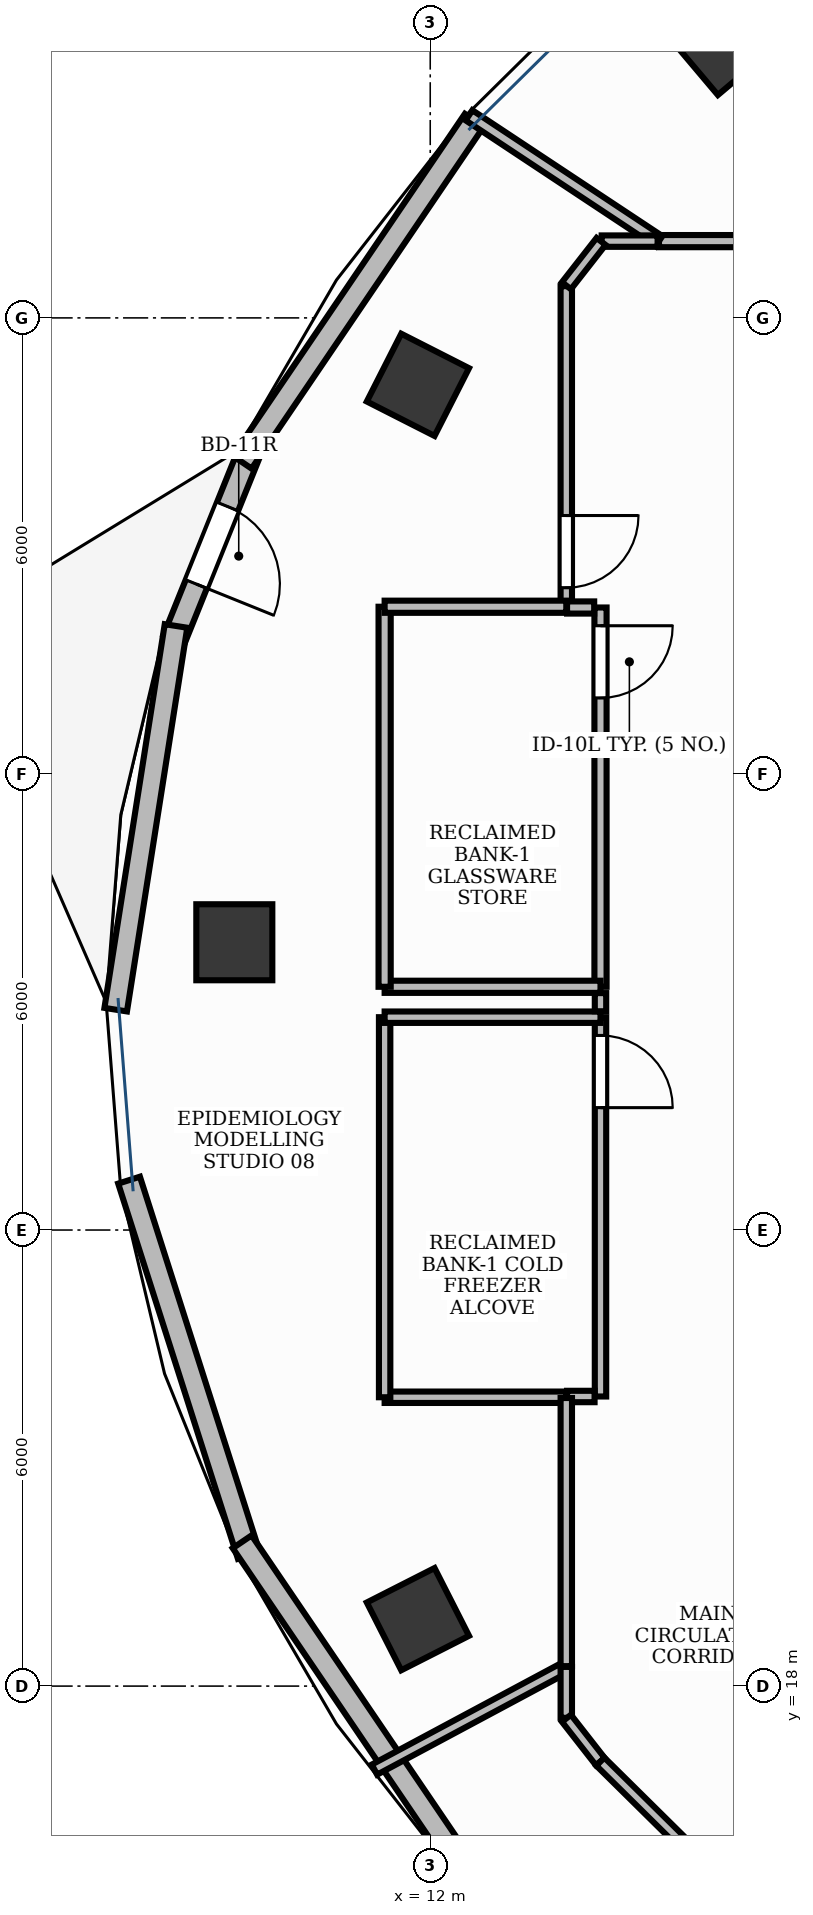
"""IFC4 building model, lengths in metres.
Left out: names, types, materials, properties, quantities, classifications, styles, units other than length and angle.
Written with IfcOpenShell. Run it as: python <this file> out.ifc"""

import sys

from ifc_helpers import new_model, si_unit, direction, frame, frame_2d, origin, origin_2d, place, context, subcontext, project, spatial, rectangle, extrude, element, fill, save


model = new_model("IFC4")
c1 = context("Model", 3, precision=1e-05, world=origin(), true_north=direction((0.0, 1.0)))
c2 = subcontext(c1, "Body", "Model", "MODEL_VIEW")
j1 = project(units=[si_unit("LENGTHUNIT", "METRE"), si_unit("PLANEANGLEUNIT", "RADIAN")], contexts=[c1])
p1 = place(None, origin())
s1 = spatial("IfcSite", under=j1, at=p1, CompositionType="ELEMENT")
p2 = place(p1, origin())
s2 = spatial("IfcBuilding", under=s1, at=p2, CompositionType="ELEMENT")
p3 = place(p2, frame((0.0, 0.0, 171.0)))
s3 = spatial("IfcBuildingStorey", under=s2, at=p3, CompositionType="ELEMENT", Elevation=171.0)
for number, where, z_axis, x_axis in (
    (1, (15.844, 39.637, -0.0), (0.0, 0.0, 1.0), (0.764, 0.645, 0.0)),
    (2, (11.838, 35.119, -0.0), (0.0, 0.0, 1.0), (0.453, 0.891, 0.0)),
    (3, (9.423, 27.786, -0.0), (0.0, 0.0, 1.0), (0.0, 1.0, 0.0)),
    (4, (11.838, 18.881, -0.0), (0.0, 0.0, 1.0), (-0.453, 0.891, 0.0)),
):
    element("IfcColumn", number, at=place(p3, frame(where, z_axis=z_axis, x_axis=x_axis)), inside=s3, PredefinedType="COLUMN", context=c2, shape_type="SweptSolid", body=[
        extrude(rectangle(XDim=1.0, YDim=1.0, at=origin_2d()), origin(), (0.0, 0.0, 1.0), 3.901),
    ])
p4 = place(p3, frame((9.626, 34.242, 0.0), z_axis=(0.0, 0.0, 1.0), x_axis=(-0.373983610438, -0.927435312636, 0.0)))
e5 = element("IfcWall", 5, at=p4, inside=s3, PredefinedType="STANDARD", context=c2, shape_type="SweptSolid", body=[
    extrude(rectangle(XDim=2.661, YDim=0.3, at=frame_2d((1.331, 0.0))), origin(), (0.0, 0.0, 1.0), 3.9),
])
p5 = place(p4, frame((0.781, 0.0, 0.0)))
e6 = element("IfcOpeningElement", 6, at=p5, cuts=e5, PredefinedType="OPENING", context=c2, shape_type="SweptSolid", body=[
    extrude(rectangle(XDim=1.1, YDim=2.15, at=frame_2d((0.55, 1.075))), frame((0.0, 0.165, 0.0), z_axis=(0.0, -1.0, 0.0), x_axis=(1.0, 0.0, 0.0)), (0.0, 0.0, 1.0), 0.33),
])
p6 = place(p3, frame((12.58, 38.601, 0.0), z_axis=(0.0, 0.0, 1.0), x_axis=(-0.561663900064, -0.827365495634, 0.0)))
e7 = element("IfcWall", 7, at=p6, inside=s3, PredefinedType="STANDARD", context=c2, shape_type="SweptSolid", body=[
    extrude(rectangle(XDim=5.438, YDim=0.3, at=frame_2d((2.719, 0.0))), origin(), (0.0, 0.0, 1.0), 3.9),
])
p7 = place(p3, frame((8.655, 31.947, 0.0), z_axis=(0.0, 0.0, 1.0), x_axis=(-0.155280464429, -0.987870425393, 0.0)))
e8 = element("IfcWall", 8, at=p7, inside=s3, PredefinedType="STANDARD", context=c2, shape_type="SweptSolid", body=[
    extrude(rectangle(XDim=5.11, YDim=0.3, at=frame_2d((2.555, 0.0))), origin(), (0.0, 0.0, 1.0), 3.9),
])
p8 = place(p3, frame((8.038, 24.656, 0.0), z_axis=(0.0, 0.0, 1.0), x_axis=(0.303930984078, -0.952694052106, 0.0)))
e9 = element("IfcWall", 9, at=p8, inside=s3, PredefinedType="STANDARD", context=c2, shape_type="SweptSolid", body=[
    extrude(rectangle(XDim=5.181, YDim=0.3, at=frame_2d((2.591, 0.0))), origin(), (0.0, 0.0, 1.0), 3.47),
])
p9 = place(p3, frame((9.526, 19.898, 0.0), z_axis=(0.0, 0.0, 1.0), x_axis=(0.561663900064, -0.827365495634, 0.0)))
e10 = element("IfcWall", 10, at=p9, inside=s3, PredefinedType="STANDARD", context=c2, shape_type="SweptSolid", body=[
    extrude(rectangle(XDim=5.438, YDim=0.3, at=frame_2d((2.719, 0.0))), origin(), (0.0, 0.0, 1.0), 3.47),
])
p10 = place(p3, frame((14.24, 26.8, 0.0), z_axis=(0.0, 0.0, 1.0), x_axis=(0.0, -1.0, 0.0)))
e11 = element("IfcWall", 11, at=p10, inside=s3, PredefinedType="PARTITIONING", context=c2, shape_type="SweptSolid", body=[
    extrude(rectangle(XDim=4.99, YDim=0.15, at=frame_2d((2.495, 0.0))), origin(), (0.0, 0.0, 1.0), 2.91),
])
p11 = place(p10, frame((0.24, 0.0, 0.0)))
e12 = element("IfcOpeningElement", 12, at=p11, cuts=e11, PredefinedType="OPENING", context=c2, shape_type="SweptSolid", body=[
    extrude(rectangle(XDim=0.95, YDim=2.15, at=frame_2d((0.475, 1.075))), frame((0.0, 0.09, 0.0), z_axis=(0.0, -1.0, 0.0), x_axis=(1.0, 0.0, 0.0)), (0.0, 0.0, 1.0), 0.18),
])
p12 = place(p3, frame((14.24, 32.19, 0.0), z_axis=(0.0, 0.0, 1.0), x_axis=(0.0, -1.0, 0.0)))
e13 = element("IfcWall", 13, at=p12, inside=s3, PredefinedType="PARTITIONING", context=c2, shape_type="SweptSolid", body=[
    extrude(rectangle(XDim=4.99, YDim=0.16, at=frame_2d((2.495, 0.0))), origin(), (0.0, 0.0, 1.0), 2.91),
])
p13 = place(p12, frame((0.24, 0.0, 0.0)))
e14 = element("IfcOpeningElement", 14, at=p13, cuts=e13, PredefinedType="OPENING", context=c2, shape_type="SweptSolid", body=[
    extrude(rectangle(XDim=0.95, YDim=2.15, at=frame_2d((0.475, 1.075))), frame((0.0, 0.095, 0.0), z_axis=(0.0, -1.0, 0.0), x_axis=(1.0, 0.0, 0.0)), (0.0, 0.0, 1.0), 0.19),
])
p14 = place(p3, frame((13.79, 36.417, 0.0), z_axis=(0.0, 0.0, 1.0), x_axis=(0.0, -1.0, 0.0)))
e15 = element("IfcWall", 15, at=p14, inside=s3, PredefinedType="PARTITIONING", context=c2, shape_type="SweptSolid", body=[
    extrude(rectangle(XDim=4.208, YDim=0.15, at=frame_2d((2.104, 0.0))), origin(), (0.0, 0.0, 1.0), 2.91),
])
p15 = place(p14, frame((3.017, 0.0, 0.0)))
e16 = element("IfcOpeningElement", 16, at=p15, cuts=e15, PredefinedType="OPENING", context=c2, shape_type="SweptSolid", body=[
    extrude(rectangle(XDim=0.95, YDim=2.15, at=frame_2d((0.475, 1.075))), frame((0.0, 0.09, 0.0), z_axis=(0.0, -1.0, 0.0), x_axis=(1.0, 0.0, 0.0)), (0.0, 0.0, 1.0), 0.18),
])
p16 = place(p3, frame((14.162, 21.81, 0.0), z_axis=(0.0, 0.0, 1.0), x_axis=(-1.0, 0.0, 0.0)))
e17 = element("IfcWall", 17, at=p16, inside=s3, PredefinedType="PARTITIONING", context=c2, shape_type="SweptSolid", body=[
    extrude(rectangle(XDim=0.362, YDim=0.15, at=frame_2d((0.181, 0.0))), origin(), (0.0, 0.0, 1.0), 2.91),
])
p17 = place(p3, frame((13.79, 21.8, 0.0), z_axis=(0.0, 0.0, 1.0), x_axis=(-1.0, 0.0, 0.0)))
e18 = element("IfcWall", 18, at=p17, inside=s3, PredefinedType="PARTITIONING", context=c2, shape_type="SweptSolid", body=[
    extrude(rectangle(XDim=2.39, YDim=0.15, at=frame_2d((1.195, 0.0))), origin(), (0.0, 0.0, 1.0), 2.91),
])
p18 = place(p3, frame((11.4, 21.8, 0.0), z_axis=(0.0, 0.0, 1.0), x_axis=(0.0, 1.0, 0.0)))
e19 = element("IfcWall", 19, at=p18, inside=s3, PredefinedType="PARTITIONING", context=c2, shape_type="SweptSolid", body=[
    extrude(rectangle(XDim=5.0, YDim=0.15, at=frame_2d((2.5, 0.0))), origin(), (0.0, 0.0, 1.0), 2.91),
])
p19 = place(p3, frame((11.4, 26.8, 0.0), z_axis=(0.0, 0.0, 1.0), x_axis=(1.0, 0.0, 0.0)))
e20 = element("IfcWall", 20, at=p19, inside=s3, PredefinedType="PARTITIONING", context=c2, shape_type="SweptSolid", body=[
    extrude(rectangle(XDim=2.84, YDim=0.15, at=frame_2d((1.42, 0.0))), origin(), (0.0, 0.0, 1.0), 2.91),
])
p20 = place(p3, frame((13.8, 32.19, 0.0), z_axis=(0.0, 0.0, 1.0), x_axis=(1.0, 0.0, 0.0)))
e21 = element("IfcWall", 21, at=p20, inside=s3, PredefinedType="PARTITIONING", context=c2, shape_type="SweptSolid", body=[
    extrude(rectangle(XDim=0.357, YDim=0.16, at=frame_2d((0.178, 0.0))), origin(), (0.0, 0.0, 1.0), 2.91),
])
p21 = place(p3, frame((14.24, 27.2, 0.0), z_axis=(0.0, 0.0, 1.0), x_axis=(-1.0, 0.0, 0.0)))
e22 = element("IfcWall", 22, at=p21, inside=s3, PredefinedType="PARTITIONING", context=c2, shape_type="SweptSolid", body=[
    extrude(rectangle(XDim=2.84, YDim=0.16, at=frame_2d((1.42, 0.0))), origin(), (0.0, 0.0, 1.0), 2.91),
])
p22 = place(p3, frame((11.4, 27.2, 0.0), z_axis=(0.0, 0.0, 1.0), x_axis=(0.0, 1.0, 0.0)))
e23 = element("IfcWall", 23, at=p22, inside=s3, PredefinedType="PARTITIONING", context=c2, shape_type="SweptSolid", body=[
    extrude(rectangle(XDim=5.0, YDim=0.16, at=frame_2d((2.5, 0.0))), origin(), (0.0, 0.0, 1.0), 2.91),
])
p23 = place(p3, frame((11.4, 32.2, 0.0), z_axis=(0.0, 0.0, 1.0), x_axis=(1.0, 0.0, 0.0)))
e24 = element("IfcWall", 24, at=p23, inside=s3, PredefinedType="PARTITIONING", context=c2, shape_type="SweptSolid", body=[
    extrude(rectangle(XDim=2.39, YDim=0.16, at=frame_2d((1.195, 0.0))), origin(), (0.0, 0.0, 1.0), 2.91),
])
p24 = place(p3, frame((11.266, 16.901, 0.0), z_axis=(0.0, 0.0, 1.0), x_axis=(0.8815585549, 0.472074691423, 0.0)))
e25 = element("IfcWall", 25, at=p24, inside=s3, PredefinedType="PARTITIONING", context=c2, shape_type="SweptSolid", body=[
    extrude(rectangle(XDim=2.863, YDim=0.15, at=frame_2d((1.432, 0.0))), origin(), (0.0, 0.0, 1.0), 2.91),
])
p25 = place(p3, frame((13.79, 18.253, 0.0), z_axis=(0.0, 0.0, 1.0), x_axis=(0.0, -1.0, 0.0)))
e26 = element("IfcWall", 26, at=p25, inside=s3, PredefinedType="PARTITIONING", context=c2, shape_type="SweptSolid", body=[
    extrude(rectangle(XDim=0.67, YDim=0.15, at=frame_2d((0.335, 0.0))), origin(), (0.0, 0.0, 1.0), 2.91),
])
p26 = place(p3, frame((13.792, 17.576, 0.0), z_axis=(0.0, 0.0, 1.0), x_axis=(0.615925776879, -0.787804187204, 0.0)))
e27 = element("IfcWall", 27, at=p26, inside=s3, PredefinedType="PARTITIONING", context=c2, shape_type="SweptSolid", body=[
    extrude(rectangle(XDim=0.723, YDim=0.15, at=frame_2d((0.361, 0.0))), origin(), (0.0, 0.0, 1.0), 2.91),
])
p27 = place(p3, frame((14.238, 17.006, 0.0), z_axis=(0.0, 0.0, 1.0), x_axis=(0.711447157113, -0.702739598027, 0.0)))
e28 = element("IfcWall", 28, at=p27, inside=s3, PredefinedType="PARTITIONING", context=c2, shape_type="SweptSolid", body=[
    extrude(rectangle(XDim=2.467, YDim=0.15, at=frame_2d((1.234, 0.0))), origin(), (0.0, 0.0, 1.0), 2.91),
])
p28 = place(p3, frame((17.6, 37.01, 0.0), z_axis=(0.0, 0.0, 1.0), x_axis=(-1.0, 0.0, 0.0)))
e29 = element("IfcWall", 29, at=p28, inside=s3, PredefinedType="PARTITIONING", context=c2, shape_type="SweptSolid", body=[
    extrude(rectangle(XDim=2.591, YDim=0.16, at=frame_2d((1.295, 0.0))), origin(), (0.0, 0.0, 1.0), 2.91),
])
p29 = place(p3, frame((15.01, 37.01, 0.0), z_axis=(0.0, 0.0, 1.0), x_axis=(-0.833750277905, 0.552141715589, 0.0)))
e30 = element("IfcWall", 30, at=p29, inside=s3, PredefinedType="PARTITIONING", context=c2, shape_type="SweptSolid", body=[
    extrude(rectangle(XDim=2.998, YDim=0.16, at=frame_2d((1.499, 0.0))), origin(), (0.0, 0.0, 1.0), 2.91),
])
p30 = place(p3, frame((14.991, 37.01, 0.0), z_axis=(0.0, 0.0, 1.0), x_axis=(-1.0, 0.0, 0.0)))
e31 = element("IfcWall", 31, at=p30, inside=s3, PredefinedType="PARTITIONING", context=c2, shape_type="SweptSolid", body=[
    extrude(rectangle(XDim=0.736, YDim=0.15, at=frame_2d((0.368, 0.0))), origin(), (0.0, 0.0, 1.0), 2.91),
])
p31 = place(p3, frame((14.248, 37.006, 0.0), z_axis=(0.0, 0.0, 1.0), x_axis=(-0.616041172792, -0.787713954063, 0.0)))
e32 = element("IfcWall", 32, at=p31, inside=s3, PredefinedType="PARTITIONING", context=c2, shape_type="SweptSolid", body=[
    extrude(rectangle(XDim=0.74, YDim=0.15, at=frame_2d((0.37, 0.0))), origin(), (0.0, 0.0, 1.0), 2.91),
])
p32 = place(p3, frame((14.24, 27.117, 0.0), z_axis=(0.0, 0.0, 1.0), x_axis=(0.0, -1.0, 0.0)))
e33 = element("IfcWall", 33, at=p32, inside=s3, PredefinedType="PARTITIONING", context=c2, shape_type="SweptSolid", body=[
    extrude(rectangle(XDim=0.239, YDim=0.15, at=frame_2d((0.12, 0.0))), origin(), (0.0, 0.0, 1.0), 2.91),
])
p33 = place(p3, frame((13.79, 21.79, 0.0), z_axis=(0.0, 0.0, 1.0), x_axis=(0.0, -1.0, 0.0)))
e34 = element("IfcWall", 34, at=p33, inside=s3, PredefinedType="PARTITIONING", context=c2, shape_type="SweptSolid", body=[
    extrude(rectangle(XDim=3.527, YDim=0.15, at=frame_2d((1.764, 0.0))), origin(), (0.0, 0.0, 1.0), 2.91),
])
p34 = place(p5, origin())
e35 = element("IfcDoor", 35, at=p34, inside=s3, OperationType="SINGLE_SWING_RIGHT", PredefinedType="DOOR", context=c2, shape_type="SweptSolid", body=[
    extrude(rectangle(XDim=1.1, YDim=2.15, at=frame_2d((0.55, 1.075))), frame((0.0, 0.025, 0.0), z_axis=(0.0, -1.0, 0.0), x_axis=(1.0, 0.0, 0.0)), (0.0, 0.0, 1.0), 0.05),
])
fill(e6, e35)
p35 = place(p11, origin())
e36 = element("IfcDoor", 36, at=p35, inside=s3, OperationType="SINGLE_SWING_RIGHT", PredefinedType="DOOR", context=c2, shape_type="SweptSolid", body=[
    extrude(rectangle(XDim=0.95, YDim=2.15, at=frame_2d((0.475, 1.075))), frame((0.0, 0.025, 0.0), z_axis=(0.0, -1.0, 0.0), x_axis=(1.0, 0.0, 0.0)), (0.0, 0.0, 1.0), 0.05),
])
fill(e12, e36)
p36 = place(p13, origin())
e37 = element("IfcDoor", 37, at=p36, inside=s3, OperationType="SINGLE_SWING_LEFT", PredefinedType="DOOR", context=c2, shape_type="SweptSolid", body=[
    extrude(rectangle(XDim=0.95, YDim=2.15, at=frame_2d((0.475, 1.075))), frame((0.0, 0.025, 0.0), z_axis=(0.0, -1.0, 0.0), x_axis=(1.0, 0.0, 0.0)), (0.0, 0.0, 1.0), 0.05),
])
fill(e14, e37)
p37 = place(p15, origin())
e38 = element("IfcDoor", 38, at=p37, inside=s3, OperationType="SINGLE_SWING_LEFT", PredefinedType="DOOR", context=c2, shape_type="SweptSolid", body=[
    extrude(rectangle(XDim=0.95, YDim=2.15, at=frame_2d((0.475, 1.075))), frame((0.0, 0.025, 0.0), z_axis=(0.0, -1.0, 0.0), x_axis=(1.0, 0.0, 0.0)), (0.0, 0.0, 1.0), 0.05),
])
fill(e16, e38)
save(model, sys.argv[1])
